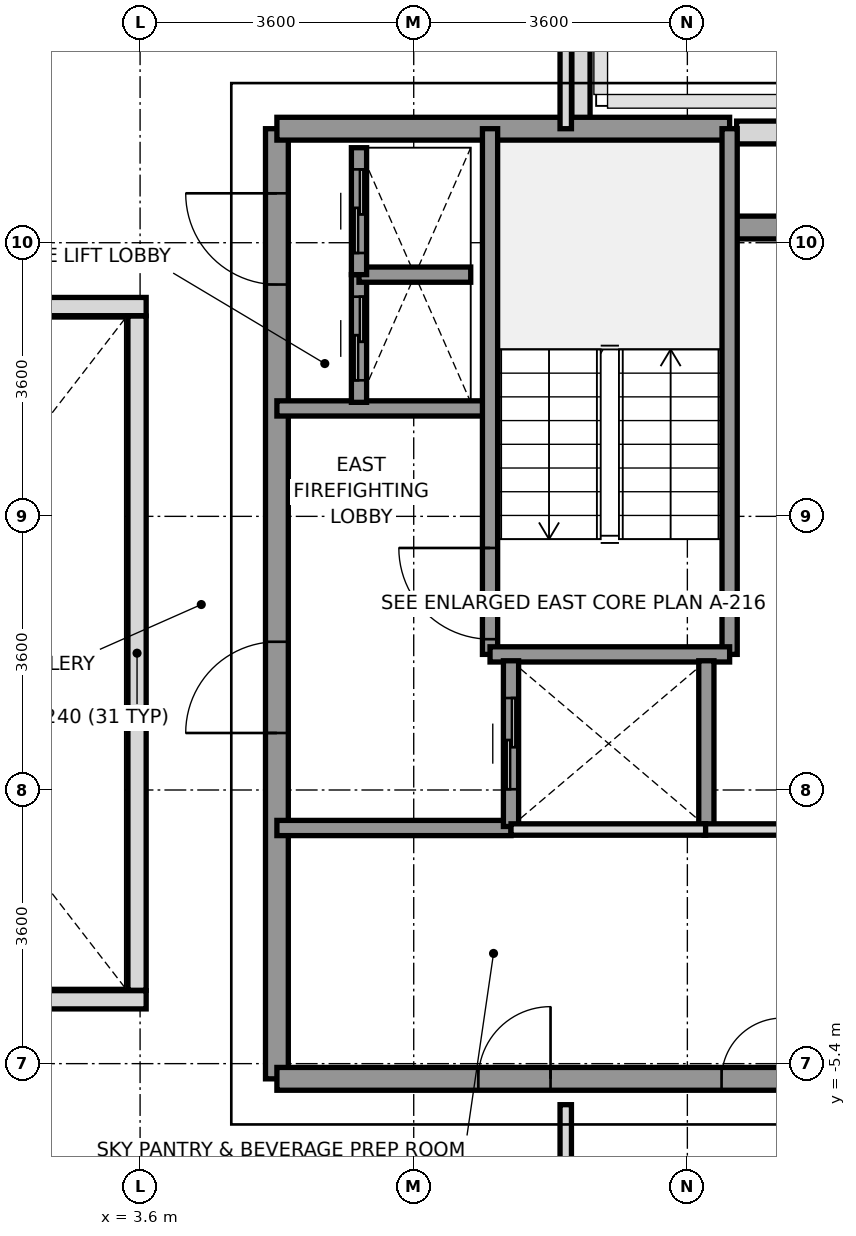
"""IFC4 building model, lengths in metres.
Left out: names, types, materials, properties, quantities, classifications, styles, units other than length and angle.
Written with IfcOpenShell. Run it as: python <this file> out.ifc"""

import sys

from ifc_helpers import new_model, si_unit, direction, frame, frame_2d, origin, place, context, subcontext, project, spatial, rectangle, extrude, source, transform, mapped, element, fill, save


model = new_model("IFC4")
c1 = context("Model", 3, precision=1e-05, world=origin(), true_north=direction((0.0, 1.0)))
c2 = subcontext(c1, "Body", "Model", "MODEL_VIEW")
j1 = project(units=[si_unit("LENGTHUNIT", "METRE"), si_unit("PLANEANGLEUNIT", "RADIAN")], contexts=[c1])
p1 = place(None, origin())
s1 = spatial("IfcSite", under=j1, at=p1, CompositionType="ELEMENT")
p2 = place(p1, origin())
s2 = spatial("IfcBuilding", under=s1, at=p2, CompositionType="ELEMENT")
p3 = place(p2, frame((0.0, 0.0, 252.4)))
s3 = spatial("IfcBuildingStorey", under=s2, at=p3, CompositionType="ELEMENT", Elevation=252.4)
p4 = place(p3, frame((11.448, 6.85, 0.0), z_axis=(0.0, 0.0, 1.0), x_axis=(1.0, 0.0, 0.0)))
e1 = element("IfcWall", 1, at=p4, inside=s3, PredefinedType="SOLIDWALL", context=c2, shape_type="SweptSolid", body=[
    extrude(rectangle(XDim=2.152, YDim=0.3, at=frame_2d((1.076, 0.0))), origin(), (0.0, 0.0, 1.0), 3.01),
])
p5 = place(p3, frame((9.4, 8.622, 0.0), z_axis=(0.0, 0.0, 1.0), x_axis=(0.0, -1.0, 0.0)))
e2 = element("IfcWall", 2, at=p5, inside=s3, PredefinedType="PARAPET", context=c2, shape_type="SweptSolid", body=[
    extrude(rectangle(XDim=1.669, YDim=0.24, at=frame_2d((0.834, 0.0))), origin(), (0.0, 0.0, 1.0), 1.15),
])
p6 = place(p3, frame((5.4, -5.6, 0.0), z_axis=(0.0, 0.0, 1.0), x_axis=(0.0, 1.0, 0.0)))
e3 = element("IfcWall", 3, at=p6, inside=s3, PredefinedType="SHEAR", context=c2, shape_type="SweptSolid", body=[
    extrude(rectangle(XDim=12.5, YDim=0.3, at=frame_2d((6.25, 0.0))), origin(), (0.0, 0.0, 1.0), 3.01),
])
p7 = place(p6, frame((4.55, 0.0, 0.0)))
e4 = element("IfcOpeningElement", 4, at=p7, cuts=e3, PredefinedType="OPENING", context=c2, shape_type="SweptSolid", body=[
    extrude(rectangle(XDim=1.2, YDim=2.2, at=frame_2d((0.6, 1.1))), frame((0.0, 0.16, 0.0), z_axis=(0.0, -1.0, 0.0), x_axis=(1.0, 0.0, 0.0)), (0.0, 0.0, 1.0), 0.32),
])
p8 = place(p6, frame((10.45, 0.0, 0.0)))
e5 = element("IfcOpeningElement", 5, at=p8, cuts=e3, PredefinedType="OPENING", context=c2, shape_type="SweptSolid", body=[
    extrude(rectangle(XDim=1.2, YDim=2.2, at=frame_2d((0.6, 1.1))), frame((0.0, 0.16, 0.0), z_axis=(0.0, -1.0, 0.0), x_axis=(1.0, 0.0, 0.0)), (0.0, 0.0, 1.0), 0.32),
])
p9 = place(p3, frame((5.4, 6.9, 0.0), z_axis=(0.0, 0.0, 1.0), x_axis=(1.0, 0.0, 0.0)))
e6 = element("IfcWall", 6, at=p9, inside=s3, PredefinedType="SHEAR", context=c2, shape_type="SweptSolid", body=[
    extrude(rectangle(XDim=5.956, YDim=0.3, at=frame_2d((2.978, 0.0))), origin(), (0.0, 0.0, 1.0), 3.01),
])
p10 = place(p3, frame((11.356, 5.6, 0.0), z_axis=(0.0, 0.0, 1.0), x_axis=(1.0, 0.0, 0.0)))
e7 = element("IfcWall", 7, at=p10, inside=s3, PredefinedType="SHEAR", context=c2, shape_type="SweptSolid", body=[
    extrude(rectangle(XDim=1.844, YDim=0.3, at=frame_2d((0.922, 0.0))), origin(), (0.0, 0.0, 1.0), 3.01),
])
p11 = place(p3, frame((5.4, -5.6, 0.0), z_axis=(0.0, 0.0, 1.0), x_axis=(1.0, 0.0, 0.0)))
e8 = element("IfcWall", 8, at=p11, inside=s3, PredefinedType="SHEAR", context=c2, shape_type="SweptSolid", body=[
    extrude(rectangle(XDim=7.8, YDim=0.3, at=frame_2d((3.9, 0.0))), origin(), (0.0, 0.0, 1.0), 3.01),
])
p12 = place(p11, frame((5.85, 0.0, 0.0)))
e9 = element("IfcOpeningElement", 9, at=p12, cuts=e8, PredefinedType="OPENING", context=c2, shape_type="SweptSolid", body=[
    extrude(rectangle(XDim=0.8, YDim=2.1, at=frame_2d((0.4, 1.05))), frame((0.0, 0.16, 0.0), z_axis=(0.0, -1.0, 0.0), x_axis=(1.0, 0.0, 0.0)), (0.0, 0.0, 1.0), 0.32),
])
p13 = place(p11, frame((2.65, 0.0, 0.0)))
e10 = element("IfcOpeningElement", 10, at=p13, cuts=e8, PredefinedType="OPENING", context=c2, shape_type="SweptSolid", body=[
    extrude(rectangle(XDim=0.95, YDim=2.15, at=frame_2d((0.475, 1.075))), frame((0.0, 0.16, 0.0), z_axis=(0.0, -1.0, 0.0), x_axis=(1.0, 0.0, 0.0)), (0.0, 0.0, 1.0), 0.32),
])
p14 = place(p3, frame((5.4, 3.22, 0.0), z_axis=(0.0, 0.0, 1.0), x_axis=(1.0, 0.0, 0.0)))
e11 = element("IfcWall", 11, at=p14, inside=s3, PredefinedType="SOLIDWALL", context=c2, shape_type="SweptSolid", body=[
    extrude(rectangle(XDim=2.78, YDim=0.2, at=frame_2d((1.39, 0.0))), origin(), (0.0, 0.0, 1.0), 3.01),
])
p15 = place(p3, frame((5.4, -2.3, 0.0), z_axis=(0.0, 0.0, 1.0), x_axis=(1.0, 0.0, 0.0)))
e12 = element("IfcWall", 12, at=p15, inside=s3, PredefinedType="SOLIDWALL", context=c2, shape_type="SweptSolid", body=[
    extrude(rectangle(XDim=3.08, YDim=0.2, at=frame_2d((1.54, 0.0))), origin(), (0.0, 0.0, 1.0), 3.01),
])
p16 = place(p3, frame((8.204, -0.016, 0.0), z_axis=(0.0, 0.0, 1.0), x_axis=(0.0, 1.0, 0.0)))
e13 = element("IfcWall", 13, at=p16, inside=s3, PredefinedType="SOLIDWALL", context=c2, shape_type="SweptSolid", body=[
    extrude(rectangle(XDim=6.916, YDim=0.2, at=frame_2d((3.458, 0.0))), origin(), (0.0, 0.0, 1.0), 3.01),
])
p17 = place(p16, frame((0.2, 0.0, 0.0)))
e14 = element("IfcOpeningElement", 14, at=p17, cuts=e13, PredefinedType="OPENING", context=c2, shape_type="SweptSolid", body=[
    extrude(rectangle(XDim=1.2, YDim=2.2, at=frame_2d((0.6, 1.1))), frame((0.0, 0.11, 0.0), z_axis=(0.0, -1.0, 0.0), x_axis=(1.0, 0.0, 0.0)), (0.0, 0.0, 1.0), 0.22),
])
p18 = place(p3, frame((11.356, -0.016, 0.0), z_axis=(0.0, 0.0, 1.0), x_axis=(0.0, 1.0, 0.0)))
e15 = element("IfcWall", 15, at=p18, inside=s3, PredefinedType="SOLIDWALL", context=c2, shape_type="SweptSolid", body=[
    extrude(rectangle(XDim=6.916, YDim=0.2, at=frame_2d((3.458, 0.0))), origin(), (0.0, 0.0, 1.0), 3.01),
])
p19 = place(p3, frame((8.204, -0.016, 0.0), z_axis=(0.0, 0.0, 1.0), x_axis=(1.0, 0.0, 0.0)))
e16 = element("IfcWall", 16, at=p19, inside=s3, PredefinedType="SOLIDWALL", context=c2, shape_type="SweptSolid", body=[
    extrude(rectangle(XDim=3.152, YDim=0.2, at=frame_2d((1.576, 0.0))), origin(), (0.0, 0.0, 1.0), 3.01),
])
p20 = place(p3, frame((8.48, -2.28, 0.0), z_axis=(0.0, 0.0, 1.0), x_axis=(0.0, 1.0, 0.0)))
e17 = element("IfcWall", 17, at=p20, inside=s3, PredefinedType="SOLIDWALL", context=c2, shape_type="SweptSolid", body=[
    extrude(rectangle(XDim=2.18, YDim=0.2, at=frame_2d((1.09, 0.0))), origin(), (0.0, 0.0, 1.0), 3.01),
])
p21 = place(p20, frame((0.49, 0.0, 0.0)))
e18 = element("IfcOpeningElement", 18, at=p21, cuts=e17, PredefinedType="OPENING", context=c2, shape_type="SweptSolid", body=[
    extrude(rectangle(XDim=1.2, YDim=2.2, at=frame_2d((0.6, 1.1))), frame((0.0, 0.11, 0.0), z_axis=(0.0, -1.0, 0.0), x_axis=(1.0, 0.0, 0.0)), (0.0, 0.0, 1.0), 0.22),
])
p22 = place(p3, frame((11.05, -2.28, 0.0), z_axis=(0.0, 0.0, 1.0), x_axis=(0.0, 1.0, 0.0)))
e19 = element("IfcWall", 19, at=p22, inside=s3, PredefinedType="SOLIDWALL", context=c2, shape_type="SweptSolid", body=[
    extrude(rectangle(XDim=2.18, YDim=0.2, at=frame_2d((1.09, 0.0))), origin(), (0.0, 0.0, 1.0), 3.01),
])
p23 = place(p3, frame((6.48, 3.3, 0.0), z_axis=(0.0, 0.0, 1.0), x_axis=(0.0, 1.0, 0.0)))
e20 = element("IfcWall", 20, at=p23, inside=s3, PredefinedType="SOLIDWALL", context=c2, shape_type="SweptSolid", body=[
    extrude(rectangle(XDim=1.68, YDim=0.2, at=frame_2d((0.84, 0.0))), origin(), (0.0, 0.0, 1.0), 3.01),
])
p24 = place(p23, frame((0.29, 0.0, 0.0)))
e21 = element("IfcOpeningElement", 21, at=p24, cuts=e20, PredefinedType="OPENING", context=c2, shape_type="SweptSolid", body=[
    extrude(rectangle(XDim=1.1, YDim=2.2, at=frame_2d((0.55, 1.1))), frame((0.0, 0.11, 0.0), z_axis=(0.0, -1.0, 0.0), x_axis=(1.0, 0.0, 0.0)), (0.0, 0.0, 1.0), 0.22),
])
p25 = place(p3, frame((6.48, 4.98, 0.0), z_axis=(0.0, 0.0, 1.0), x_axis=(1.0, 0.0, 0.0)))
e22 = element("IfcWall", 22, at=p25, inside=s3, PredefinedType="SOLIDWALL", context=c2, shape_type="SweptSolid", body=[
    extrude(rectangle(XDim=1.47, YDim=0.2, at=frame_2d((0.735, 0.0))), origin(), (0.0, 0.0, 1.0), 3.01),
])
p26 = place(p3, frame((6.48, 4.98, 0.0), z_axis=(0.0, 0.0, 1.0), x_axis=(0.0, 1.0, 0.0)))
e23 = element("IfcWall", 23, at=p26, inside=s3, PredefinedType="SOLIDWALL", context=c2, shape_type="SweptSolid", body=[
    extrude(rectangle(XDim=1.67, YDim=0.2, at=frame_2d((0.835, 0.0))), origin(), (0.0, 0.0, 1.0), 3.01),
])
p27 = place(p26, frame((0.285, 0.0, 0.0)))
e24 = element("IfcOpeningElement", 24, at=p27, cuts=e23, PredefinedType="OPENING", context=c2, shape_type="SweptSolid", body=[
    extrude(rectangle(XDim=1.1, YDim=2.2, at=frame_2d((0.55, 1.1))), frame((0.0, 0.11, 0.0), z_axis=(0.0, -1.0, 0.0), x_axis=(1.0, 0.0, 0.0)), (0.0, 0.0, 1.0), 0.22),
])
p28 = place(p3, frame((11.02, -2.32, 0.0), z_axis=(0.0, 0.0, 1.0), x_axis=(1.0, 0.0, 0.0)))
e25 = element("IfcWall", 25, at=p28, inside=s3, PredefinedType="PARTITIONING", context=c2, shape_type="SweptSolid", body=[
    extrude(rectangle(XDim=2.18, YDim=0.15, at=frame_2d((1.09, 0.0))), origin(), (0.0, 0.0, 1.0), 3.01),
])
p29 = place(p3, frame((8.48, -2.32, 0.0), z_axis=(0.0, 0.0, 1.0), x_axis=(1.0, 0.0, 0.0)))
e26 = element("IfcWall", 26, at=p29, inside=s3, PredefinedType="PARTITIONING", context=c2, shape_type="SweptSolid", body=[
    extrude(rectangle(XDim=2.56, YDim=0.15, at=frame_2d((1.28, 0.0))), origin(), (0.0, 0.0, 1.0), 3.01),
])
p30 = place(p3, frame((9.2, 6.9, 0.0), z_axis=(0.0, 0.0, 1.0), x_axis=(0.0, 1.0, 0.0)))
e27 = element("IfcWall", 27, at=p30, inside=s3, PredefinedType="PARTITIONING", context=c2, shape_type="SweptSolid", body=[
    extrude(rectangle(XDim=3.38, YDim=0.15, at=frame_2d((1.69, 0.0))), origin(), (0.0, 0.0, 1.0), 2.61),
])
p31 = place(p3, frame((9.2, -10.28, 0.0), z_axis=(0.0, 0.0, 1.0), x_axis=(0.0, 1.0, 0.0)))
e28 = element("IfcWall", 28, at=p31, inside=s3, PredefinedType="PARTITIONING", context=c2, shape_type="SweptSolid", body=[
    extrude(rectangle(XDim=4.34, YDim=0.15, at=frame_2d((2.17, 0.0))), origin(), (0.0, 0.0, 1.0), 2.61),
])
for number, where, z_axis, x_axis in (
    (29, (-3.68, -4.56, 0.0), (0.0, 0.0, 1.0), (1.0, 0.0, 0.0)),
    (30, (-3.68, 4.56, 0.0), (0.0, 0.0, 1.0), (1.0, 0.0, 0.0)),
):
    element("IfcWall", number, at=place(p3, frame(where, z_axis=z_axis, x_axis=x_axis)), inside=s3, PredefinedType="PARAPET", context=c2, shape_type="SweptSolid", body=[
        extrude(rectangle(XDim=7.36, YDim=0.24, at=frame_2d((3.68, 0.0))), origin(), (0.0, 0.0, 1.0), 1.15),
    ])
p32 = place(p3, frame((3.56, -4.435, 0.0), z_axis=(0.0, 0.0, 1.0), x_axis=(0.0, 1.0, 0.0)))
e31 = element("IfcWall", 31, at=p32, inside=s3, PredefinedType="PARAPET", context=c2, shape_type="SweptSolid", body=[
    extrude(rectangle(XDim=8.87, YDim=0.24, at=frame_2d((4.435, 0.0))), origin(), (0.0, 0.0, 1.0), 1.15),
])
m1 = source(origin(), c2, "Body", "SweptSolid", [
    extrude(rectangle(XDim=1.2, YDim=2.2, at=frame_2d((0.6, 1.1))), frame((0.0, 0.025, 0.0), z_axis=(0.0, -1.0, 0.0), x_axis=(1.0, 0.0, 0.0)), (0.0, 0.0, 1.0), 0.05),
])
p33 = place(p17, origin())
e32 = element("IfcDoor", 32, at=p33, inside=s3, OperationType="SINGLE_SWING_RIGHT", PredefinedType="DOOR", context=c2, shape_type="MappedRepresentation", body=[
    mapped(m1, transform((0.0, 0.0, 0.0), x_axis=(1.0, 0.0, 0.0), y_axis=(0.0, 1.0, 0.0), z_axis=(0.0, 0.0, 1.0), scale=1.0)),
])
fill(e14, e32)
p34 = place(p7, origin())
e33 = element("IfcDoor", 33, at=p34, inside=s3, OperationType="SINGLE_SWING_LEFT", PredefinedType="DOOR", context=c2, shape_type="MappedRepresentation", body=[
    mapped(m1, transform((0.0, 0.0, 0.0), x_axis=(1.0, 0.0, 0.0), y_axis=(0.0, 1.0, 0.0), z_axis=(0.0, 0.0, 1.0), scale=1.0)),
])
fill(e4, e33)
p35 = place(p8, origin())
e34 = element("IfcDoor", 34, at=p35, inside=s3, OperationType="SINGLE_SWING_RIGHT", PredefinedType="DOOR", context=c2, shape_type="MappedRepresentation", body=[
    mapped(m1, transform((0.0, 0.0, 0.0), x_axis=(1.0, 0.0, 0.0), y_axis=(0.0, 1.0, 0.0), z_axis=(0.0, 0.0, 1.0), scale=1.0)),
])
fill(e5, e34)
m2 = source(origin(), c2, "Body", "SweptSolid", [
    extrude(rectangle(XDim=0.8, YDim=2.1, at=frame_2d((0.4, 1.05))), frame((0.0, 0.025, 0.0), z_axis=(0.0, -1.0, 0.0), x_axis=(1.0, 0.0, 0.0)), (0.0, 0.0, 1.0), 0.05),
])
p36 = place(p12, origin())
e35 = element("IfcDoor", 35, at=p36, inside=s3, OperationType="SINGLE_SWING_RIGHT", PredefinedType="DOOR", context=c2, shape_type="MappedRepresentation", body=[
    mapped(m2, transform((0.0, 0.0, 0.0), x_axis=(1.0, 0.0, 0.0), y_axis=(0.0, 1.0, 0.0), z_axis=(0.0, 0.0, 1.0), scale=1.0)),
])
fill(e9, e35)
m3 = source(origin(), c2, "Body", "SweptSolid", [
    extrude(rectangle(XDim=0.95, YDim=2.15, at=frame_2d((0.475, 1.075))), frame((0.0, 0.025, 0.0), z_axis=(0.0, -1.0, 0.0), x_axis=(1.0, 0.0, 0.0)), (0.0, 0.0, 1.0), 0.05),
])
p37 = place(p13, origin())
e36 = element("IfcDoor", 36, at=p37, inside=s3, OperationType="SINGLE_SWING_RIGHT", PredefinedType="DOOR", context=c2, shape_type="MappedRepresentation", body=[
    mapped(m3, transform((0.0, 0.0, 0.0), x_axis=(1.0, 0.0, 0.0), y_axis=(0.0, 1.0, 0.0), z_axis=(0.0, 0.0, 1.0), scale=1.0)),
])
fill(e10, e36)
p38 = place(p21, origin())
e37 = element("IfcDoor", 37, at=p38, inside=s3, OperationType="SLIDING_TO_RIGHT", PredefinedType="DOOR", context=c2, shape_type="MappedRepresentation", body=[
    mapped(m1, transform((0.0, 0.0, 0.0), x_axis=(1.0, 0.0, 0.0), y_axis=(0.0, 1.0, 0.0), z_axis=(0.0, 0.0, 1.0), scale=1.0)),
])
fill(e18, e37)
m4 = source(origin(), c2, "Body", "SweptSolid", [
    extrude(rectangle(XDim=1.1, YDim=2.2, at=frame_2d((0.55, 1.1))), frame((0.0, 0.025, 0.0), z_axis=(0.0, -1.0, 0.0), x_axis=(1.0, 0.0, 0.0)), (0.0, 0.0, 1.0), 0.05),
])
p39 = place(p24, origin())
e38 = element("IfcDoor", 38, at=p39, inside=s3, OperationType="SLIDING_TO_LEFT", PredefinedType="DOOR", context=c2, shape_type="MappedRepresentation", body=[
    mapped(m4, transform((0.0, 0.0, 0.0), x_axis=(1.0, 0.0, 0.0), y_axis=(0.0, 1.0, 0.0), z_axis=(0.0, 0.0, 1.0), scale=1.0)),
])
fill(e21, e38)
p40 = place(p27, origin())
e39 = element("IfcDoor", 39, at=p40, inside=s3, OperationType="SLIDING_TO_LEFT", PredefinedType="DOOR", context=c2, shape_type="MappedRepresentation", body=[
    mapped(m4, transform((0.0, 0.0, 0.0), x_axis=(1.0, 0.0, 0.0), y_axis=(0.0, 1.0, 0.0), z_axis=(0.0, 0.0, 1.0), scale=1.0)),
])
fill(e24, e39)
save(model, sys.argv[1])
